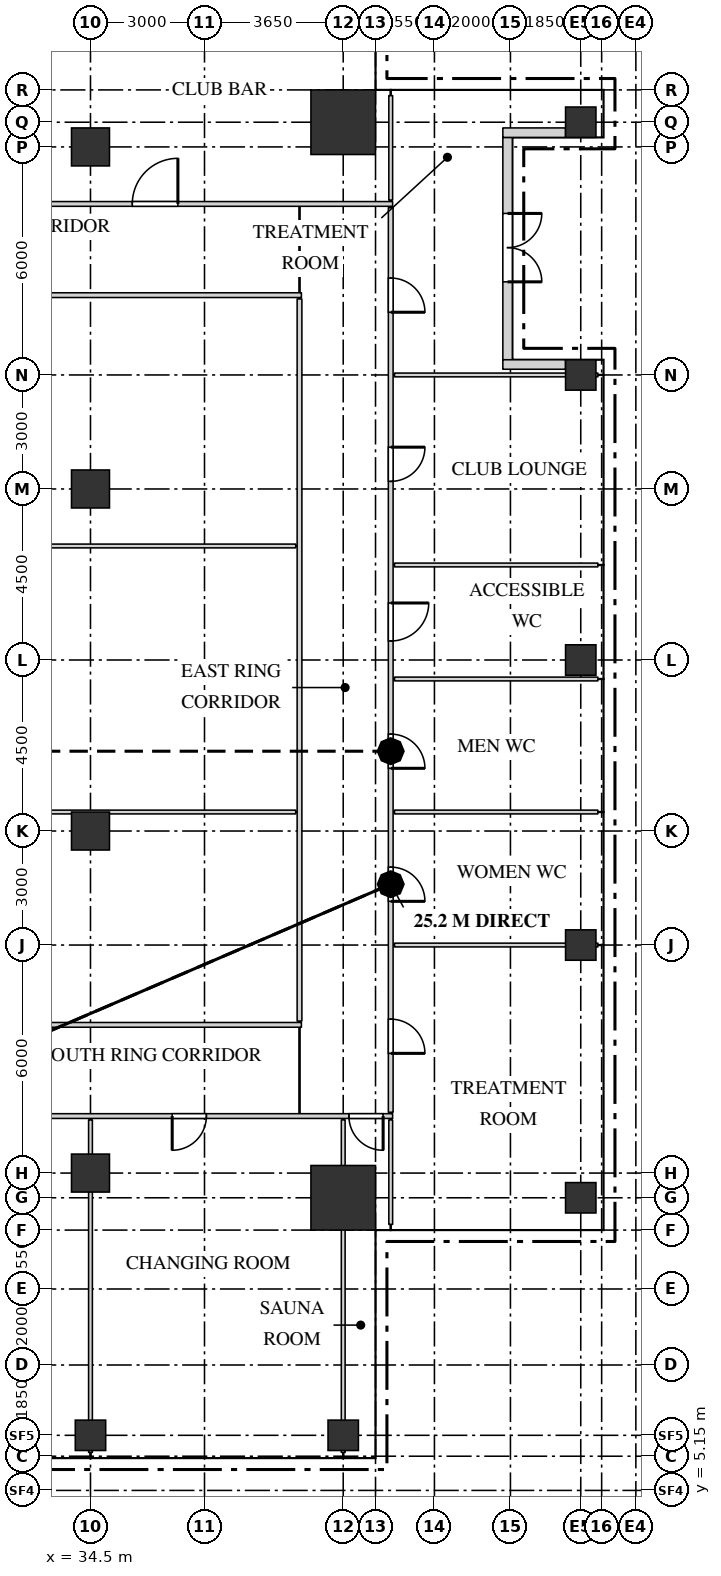
"""IFC4 building model, lengths in metres.
Left out: names, types, materials, properties, quantities, classifications, styles, units other than length and angle.
Written with IfcOpenShell. Run it as: python <this file> out.ifc"""

import sys

from ifc_helpers import new_model, si_unit, direction, frame, frame_2d, origin, origin_2d, place, context, subcontext, project, spatial, rectangle, extrude, source, transform, mapped, element, fill, save


model = new_model("IFC4")
c1 = context("Model", 3, precision=1e-05, world=origin(), true_north=direction((0.0, 1.0)))
c2 = subcontext(c1, "Body", "Model", "MODEL_VIEW")
j1 = project(units=[si_unit("LENGTHUNIT", "METRE"), si_unit("PLANEANGLEUNIT", "RADIAN")], contexts=[c1])
p1 = place(None, origin())
s1 = spatial("IfcSite", under=j1, at=p1, CompositionType="ELEMENT")
p2 = place(p1, origin())
s2 = spatial("IfcBuilding", under=s1, at=p2, CompositionType="ELEMENT")
p3 = place(p2, frame((0.0, 0.0, 298.2)))
s3 = spatial("IfcBuildingStorey", under=s2, at=p3, CompositionType="ELEMENT", Elevation=298.2)
m1 = source(origin(), c2, "Body", "SweptSolid", [
    extrude(rectangle(XDim=1.7, YDim=1.7, at=origin_2d()), origin(), (0.0, 0.0, 1.0), 3.75),
])
for number, where, z_axis, x_axis in (
    (1, (41.15, 41.15, 0.0), (0.0, 0.0, 1.0), (1.0, 0.0, 0.0)),
    (2, (41.15, 12.85, 0.0), (0.0, 0.0, 1.0), (1.0, 0.0, 0.0)),
):
    element("IfcColumn", number, at=place(p3, frame(where, z_axis=z_axis, x_axis=x_axis)), inside=s3, PredefinedType="COLUMN", context=c2, shape_type="MappedRepresentation", body=[
        mapped(m1, transform((0.0, 0.0, 0.0))),
    ])
m2 = source(origin(), c2, "Body", "SweptSolid", [
    extrude(rectangle(XDim=0.8, YDim=0.8, at=origin_2d()), origin(), (0.0, 0.0, 1.0), 3.75),
])
for number, where, z_axis, x_axis in (
    (3, (34.5, 6.6, 0.0), (0.0, 0.0, 1.0), (1.0, 0.0, 0.0)),
    (4, (41.15, 6.6, 0.0), (0.0, 0.0, 1.0), (1.0, 0.0, 0.0)),
    (5, (47.4, 12.85, 0.0), (0.0, 0.0, 1.0), (1.0, 0.0, 0.0)),
    (6, (47.4, 19.5, 0.0), (0.0, 0.0, 1.0), (1.0, 0.0, 0.0)),
    (7, (47.4, 27.0, 0.0), (0.0, 0.0, 1.0), (1.0, 0.0, 0.0)),
    (8, (47.4, 34.5, 0.0), (0.0, 0.0, 1.0), (1.0, 0.0, 0.0)),
    (9, (47.4, 41.15, 0.0), (0.0, 0.0, 1.0), (1.0, 0.0, 0.0)),
):
    element("IfcColumn", number, at=place(p3, frame(where, z_axis=z_axis, x_axis=x_axis)), inside=s3, PredefinedType="COLUMN", context=c2, shape_type="MappedRepresentation", body=[
        mapped(m2, transform((0.0, 0.0, 0.0))),
    ])
m3 = source(origin(), c2, "Body", "SweptSolid", [
    extrude(rectangle(XDim=1.0, YDim=1.0, at=origin_2d()), origin(), (0.0, 0.0, 1.0), 3.75),
])
for number, where, z_axis, x_axis in (
    (10, (34.5, 13.5, 0.0), (0.0, 0.0, 1.0), (1.0, 0.0, 0.0)),
    (11, (34.5, 22.5, 0.0), (0.0, 0.0, 1.0), (1.0, 0.0, 0.0)),
    (12, (34.5, 31.5, 0.0), (0.0, 0.0, 1.0), (1.0, 0.0, 0.0)),
    (13, (34.5, 40.5, 0.0), (0.0, 0.0, 1.0), (1.0, 0.0, 0.0)),
):
    element("IfcColumn", number, at=place(p3, frame(where, z_axis=z_axis, x_axis=x_axis)), inside=s3, PredefinedType="COLUMN", context=c2, shape_type="MappedRepresentation", body=[
        mapped(m3, transform((0.0, 0.0, 0.0))),
    ])
m4 = source(origin(), c2, "Body", "SweptSolid", [
    extrude(rectangle(XDim=5.85, YDim=0.25, at=frame_2d((2.925, 0.0))), origin(), (0.0, 0.0, 1.0), 3.75),
])
p4 = place(p3, frame((45.475, 34.9, 0.0), z_axis=(0.0, 0.0, 1.0), x_axis=(0.0, 1.0, 0.0)))
e14 = element("IfcWall", 14, at=p4, inside=s3, PredefinedType="SOLIDWALL", context=c2, shape_type="MappedRepresentation", body=[
    mapped(m4, transform((0.0, 0.0, 0.0))),
])
m5 = source(origin(), c2, "Body", "SweptSolid", [
    extrude(rectangle(XDim=1.4, YDim=2.4, at=frame_2d((0.7, 1.2))), frame((0.0, 0.135, 0.0), z_axis=(0.0, -1.0, 0.0), x_axis=(1.0, 0.0, 0.0)), (0.0, 0.0, 1.0), 0.27),
])
p5 = place(p4, frame((0.35, 0.0, 0.0)))
e15 = element("IfcOpeningElement", 15, at=p5, cuts=e14, PredefinedType="OPENING", context=c2, shape_type="MappedRepresentation", body=[
    mapped(m5, transform((0.0, 0.0, 0.0))),
])
p6 = place(p4, frame((4.15, 0.0, 0.0)))
e16 = element("IfcOpeningElement", 16, at=p6, cuts=e14, PredefinedType="OPENING", context=c2, shape_type="MappedRepresentation", body=[
    mapped(m5, transform((0.0, 0.0, 0.0))),
])
m6 = source(origin(), c2, "Body", "SweptSolid", [
    extrude(rectangle(XDim=1.8, YDim=2.4, at=frame_2d((0.9, 1.2))), frame((0.0, 0.135, 0.0), z_axis=(0.0, -1.0, 0.0), x_axis=(1.0, 0.0, 0.0)), (0.0, 0.0, 1.0), 0.27),
])
p7 = place(p4, frame((2.05, 0.0, 0.0)))
e17 = element("IfcOpeningElement", 17, at=p7, cuts=e14, PredefinedType="OPENING", context=c2, shape_type="MappedRepresentation", body=[
    mapped(m6, transform((0.0, 0.0, 0.0))),
])
m7 = source(origin(), c2, "Body", "SweptSolid", [
    extrude(rectangle(XDim=1.65, YDim=0.25, at=frame_2d((0.825, 0.0))), origin(), (0.0, 0.0, 1.0), 3.45),
])
for number, where, z_axis, x_axis in (
    (18, (47.0, 34.775, 0.0), (0.0, 0.0, 1.0), (-1.0, 0.0, 0.0)),
    (19, (47.0, 40.875, 0.0), (0.0, 0.0, 1.0), (-1.0, 0.0, 0.0)),
):
    element("IfcWall", number, at=place(p3, frame(where, z_axis=z_axis, x_axis=x_axis)), inside=s3, PredefinedType="SOLIDWALL", context=c2, shape_type="MappedRepresentation", body=[
        mapped(m7, transform((0.0, 0.0, 0.0))),
    ])
m8 = source(origin(), c2, "Body", "SweptSolid", [
    extrude(rectangle(XDim=8.75, YDim=0.1, at=frame_2d((4.375, 0.0))), origin(), (0.0, 0.0, 1.0), 3.35),
])
for number, where, z_axis, x_axis in (
    (20, (34.5, 6.15, 0.0), (0.0, 0.0, 1.0), (0.0, 1.0, 0.0)),
    (21, (41.15, 6.15, 0.0), (0.0, 0.0, 1.0), (0.0, 1.0, 0.0)),
):
    element("IfcWall", number, at=place(p3, frame(where, z_axis=z_axis, x_axis=x_axis)), inside=s3, PredefinedType="PARTITIONING", context=c2, shape_type="MappedRepresentation", body=[
        mapped(m8, transform((0.0, 0.0, 0.0))),
    ])
m9 = source(origin(), c2, "Body", "SweptSolid", [
    extrude(rectangle(XDim=2.75, YDim=0.1, at=frame_2d((1.375, 0.0))), origin(), (0.0, 0.0, 1.0), 3.8),
])
p8 = place(p3, frame((42.4, 12.15, 0.0), z_axis=(0.0, 0.0, 1.0), x_axis=(0.0, 1.0, 0.0)))
e22 = element("IfcWall", 22, at=p8, inside=s3, PredefinedType="PARTITIONING", context=c2, shape_type="MappedRepresentation", body=[
    mapped(m9, transform((0.0, 0.0, 0.0))),
])
m10 = source(origin(), c2, "Body", "SweptSolid", [
    extrude(rectangle(XDim=19.1, YDim=0.125, at=frame_2d((9.55, 0.0))), origin(), (0.0, 0.0, 1.0), 3.8),
])
p9 = place(p3, frame((23.35, 15.0, 0.0), z_axis=(0.0, 0.0, 1.0), x_axis=(1.0, 0.0, 0.0)))
e23 = element("IfcWall", 23, at=p9, inside=s3, PredefinedType="PARTITIONING", context=c2, shape_type="MappedRepresentation", body=[
    mapped(m10, transform((0.0, 0.0, 0.0))),
])
m11 = source(origin(), c2, "Body", "SweptSolid", [
    extrude(rectangle(XDim=0.9, YDim=2.1, at=frame_2d((0.45, 1.05))), frame((0.0, 0.073, 0.0), z_axis=(0.0, -1.0, 0.0), x_axis=(1.0, 0.0, 0.0)), (0.0, 0.0, 1.0), 0.145),
])
p10 = place(p9, frame((5.3, 0.0, 0.0)))
e24 = element("IfcOpeningElement", 24, at=p10, cuts=e23, PredefinedType="OPENING", context=c2, shape_type="MappedRepresentation", body=[
    mapped(m11, transform((0.0, 0.0, 0.0))),
])
p11 = place(p9, frame((13.3, 0.0, 0.0)))
e25 = element("IfcOpeningElement", 25, at=p11, cuts=e23, PredefinedType="OPENING", context=c2, shape_type="MappedRepresentation", body=[
    mapped(m11, transform((0.0, 0.0, 0.0))),
])
p12 = place(p9, frame((17.95, 0.0, 0.0)))
e26 = element("IfcOpeningElement", 26, at=p12, cuts=e23, PredefinedType="OPENING", context=c2, shape_type="MappedRepresentation", body=[
    mapped(m11, transform((0.0, 0.0, 0.0))),
])
m12 = source(origin(), c2, "Body", "SweptSolid", [
    extrude(rectangle(XDim=23.8, YDim=0.125, at=frame_2d((11.9, 0.0))), origin(), (0.0, 0.0, 1.0), 3.8),
])
p13 = place(p3, frame((42.4, 15.1, 0.0), z_axis=(0.0, 0.0, 1.0), x_axis=(0.0, 1.0, 0.0)))
e27 = element("IfcWall", 27, at=p13, inside=s3, PredefinedType="PARTITIONING", context=c2, shape_type="MappedRepresentation", body=[
    mapped(m12, transform((0.0, 0.0, 0.0))),
])
p14 = place(p13, frame((1.55, 0.0, 0.0)))
e28 = element("IfcOpeningElement", 28, at=p14, cuts=e27, PredefinedType="OPENING", context=c2, shape_type="MappedRepresentation", body=[
    mapped(m11, transform((0.0, 0.0, 0.0))),
])
p15 = place(p13, frame((5.55, 0.0, 0.0)))
e29 = element("IfcOpeningElement", 29, at=p15, cuts=e27, PredefinedType="OPENING", context=c2, shape_type="MappedRepresentation", body=[
    mapped(m11, transform((0.0, 0.0, 0.0))),
])
p16 = place(p13, frame((9.05, 0.0, 0.0)))
e30 = element("IfcOpeningElement", 30, at=p16, cuts=e27, PredefinedType="OPENING", context=c2, shape_type="MappedRepresentation", body=[
    mapped(m11, transform((0.0, 0.0, 0.0))),
])
m13 = source(origin(), c2, "Body", "SweptSolid", [
    extrude(rectangle(XDim=1.0, YDim=2.1, at=frame_2d((0.5, 1.05))), frame((0.0, 0.073, 0.0), z_axis=(0.0, -1.0, 0.0), x_axis=(1.0, 0.0, 0.0)), (0.0, 0.0, 1.0), 0.145),
])
p17 = place(p13, frame((12.4, 0.0, 0.0)))
e31 = element("IfcOpeningElement", 31, at=p17, cuts=e27, PredefinedType="OPENING", context=c2, shape_type="MappedRepresentation", body=[
    mapped(m13, transform((0.0, 0.0, 0.0))),
])
p18 = place(p13, frame((16.6, 0.0, 0.0)))
e32 = element("IfcOpeningElement", 32, at=p18, cuts=e27, PredefinedType="OPENING", context=c2, shape_type="MappedRepresentation", body=[
    mapped(m11, transform((0.0, 0.0, 0.0))),
])
p19 = place(p13, frame((21.05, 0.0, 0.0)))
e33 = element("IfcOpeningElement", 33, at=p19, cuts=e27, PredefinedType="OPENING", context=c2, shape_type="MappedRepresentation", body=[
    mapped(m11, transform((0.0, 0.0, 0.0))),
])
m14 = source(origin(), c2, "Body", "SweptSolid", [
    extrude(rectangle(XDim=16.7, YDim=0.125, at=frame_2d((8.35, 0.0))), origin(), (0.0, 0.0, 1.0), 3.8),
])
p20 = place(p3, frame((23.35, 17.4, 0.0), z_axis=(0.0, 0.0, 1.0), x_axis=(1.0, 0.0, 0.0)))
e34 = element("IfcWall", 34, at=p20, inside=s3, PredefinedType="PARTITIONING", context=c2, shape_type="MappedRepresentation", body=[
    mapped(m14, transform((0.0, 0.0, 0.0))),
])
p21 = place(p20, frame((8.05, 0.0, 0.0)))
e35 = element("IfcOpeningElement", 35, at=p21, cuts=e34, PredefinedType="OPENING", context=c2, shape_type="MappedRepresentation", body=[
    mapped(m11, transform((0.0, 0.0, 0.0))),
])
m15 = source(origin(), c2, "Body", "SweptSolid", [
    extrude(rectangle(XDim=19.0, YDim=0.125, at=frame_2d((9.5, 0.0))), origin(), (0.0, 0.0, 1.0), 3.8),
])
p22 = place(p3, frame((40.0, 17.5, 0.0), z_axis=(0.0, 0.0, 1.0), x_axis=(0.0, 1.0, 0.0)))
e36 = element("IfcWall", 36, at=p22, inside=s3, PredefinedType="PARTITIONING", context=c2, shape_type="MappedRepresentation", body=[
    mapped(m15, transform((0.0, 0.0, 0.0))),
])
m16 = source(origin(), c2, "Body", "SweptSolid", [
    extrude(rectangle(XDim=5.35, YDim=0.1, at=frame_2d((2.675, 0.0))), origin(), (0.0, 0.0, 1.0), 3.8),
])
p23 = place(p3, frame((42.5, 19.5, 0.0), z_axis=(0.0, 0.0, 1.0), x_axis=(1.0, 0.0, 0.0)))
e37 = element("IfcWall", 37, at=p23, inside=s3, PredefinedType="PARTITIONING", context=c2, shape_type="MappedRepresentation", body=[
    mapped(m16, transform((0.0, 0.0, 0.0))),
])
m17 = source(origin(), c2, "Body", "SweptSolid", [
    extrude(rectangle(XDim=16.4, YDim=0.1, at=frame_2d((8.2, 0.0))), origin(), (0.0, 0.0, 1.0), 3.8),
])
p24 = place(p3, frame((23.5, 23.0, 0.0), z_axis=(0.0, 0.0, 1.0), x_axis=(1.0, 0.0, 0.0)))
e38 = element("IfcWall", 38, at=p24, inside=s3, PredefinedType="PARTITIONING", context=c2, shape_type="MappedRepresentation", body=[
    mapped(m17, transform((0.0, 0.0, 0.0))),
])
for number, where, z_axis, x_axis in (
    (39, (42.5, 23.0, 0.0), (0.0, 0.0, 1.0), (1.0, 0.0, 0.0)),
    (40, (42.5, 26.5, 0.0), (0.0, 0.0, 1.0), (1.0, 0.0, 0.0)),
    (41, (42.5, 29.5, 0.0), (0.0, 0.0, 1.0), (1.0, 0.0, 0.0)),
):
    element("IfcWall", number, at=place(p3, frame(where, z_axis=z_axis, x_axis=x_axis)), inside=s3, PredefinedType="PARTITIONING", context=c2, shape_type="MappedRepresentation", body=[
        mapped(m16, transform((0.0, 0.0, 0.0))),
    ])
p25 = place(p3, frame((23.5, 30.0, 0.0), z_axis=(0.0, 0.0, 1.0), x_axis=(1.0, 0.0, 0.0)))
e42 = element("IfcWall", 42, at=p25, inside=s3, PredefinedType="PARTITIONING", context=c2, shape_type="MappedRepresentation", body=[
    mapped(m17, transform((0.0, 0.0, 0.0))),
])
p26 = place(p3, frame((42.5, 34.5, 0.0), z_axis=(0.0, 0.0, 1.0), x_axis=(1.0, 0.0, 0.0)))
e43 = element("IfcWall", 43, at=p26, inside=s3, PredefinedType="PARTITIONING", context=c2, shape_type="MappedRepresentation", body=[
    mapped(m16, transform((0.0, 0.0, 0.0))),
])
p27 = place(p3, frame((23.35, 36.6, 0.0), z_axis=(0.0, 0.0, 1.0), x_axis=(1.0, 0.0, 0.0)))
e44 = element("IfcWall", 44, at=p27, inside=s3, PredefinedType="PARTITIONING", context=c2, shape_type="MappedRepresentation", body=[
    mapped(m14, transform((0.0, 0.0, 0.0))),
])
p28 = place(p27, frame((8.05, 0.0, 0.0)))
e45 = element("IfcOpeningElement", 45, at=p28, cuts=e44, PredefinedType="OPENING", context=c2, shape_type="MappedRepresentation", body=[
    mapped(m11, transform((0.0, 0.0, 0.0))),
])
m18 = source(origin(), c2, "Body", "SweptSolid", [
    extrude(rectangle(XDim=12.1, YDim=0.125, at=frame_2d((6.05, 0.0))), origin(), (0.0, 0.0, 1.0), 3.8),
])
p29 = place(p3, frame((30.35, 39.0, 0.0), z_axis=(0.0, 0.0, 1.0), x_axis=(1.0, 0.0, 0.0)))
e46 = element("IfcWall", 46, at=p29, inside=s3, PredefinedType="PARTITIONING", context=c2, shape_type="MappedRepresentation", body=[
    mapped(m18, transform((0.0, 0.0, 0.0))),
])
m19 = source(origin(), c2, "Body", "SweptSolid", [
    extrude(rectangle(XDim=1.2, YDim=2.1, at=frame_2d((0.6, 1.05))), frame((0.0, 0.073, 0.0), z_axis=(0.0, -1.0, 0.0), x_axis=(1.0, 0.0, 0.0)), (0.0, 0.0, 1.0), 0.145),
])
p30 = place(p29, frame((5.25, 0.0, 0.0)))
e47 = element("IfcOpeningElement", 47, at=p30, cuts=e46, PredefinedType="OPENING", context=c2, shape_type="MappedRepresentation", body=[
    mapped(m19, transform((0.0, 0.0, 0.0))),
])
p31 = place(p3, frame((42.4, 39.1, 0.0), z_axis=(0.0, 0.0, 1.0), x_axis=(0.0, 1.0, 0.0)))
e48 = element("IfcWall", 48, at=p31, inside=s3, PredefinedType="PARTITIONING", context=c2, shape_type="MappedRepresentation", body=[
    mapped(m9, transform((0.0, 0.0, 0.0))),
])
m20 = source(origin(), c2, "Body", "SweptSolid", [
    extrude(rectangle(XDim=1.4, YDim=2.4, at=frame_2d((0.7, 1.2))), frame((0.0, 0.03, 0.0), z_axis=(0.0, -1.0, 0.0), x_axis=(1.0, 0.0, 0.0)), (0.0, 0.0, 1.0), 0.06),
])
p32 = place(p5, origin())
e49 = element("IfcWindow", 49, at=p32, inside=s3, PartitioningType="SINGLE_PANEL", PredefinedType="WINDOW", context=c2, shape_type="MappedRepresentation", body=[
    mapped(m20, transform((0.0, 0.0, 0.0))),
])
fill(e15, e49)
p33 = place(p6, origin())
e50 = element("IfcWindow", 50, at=p33, inside=s3, PartitioningType="SINGLE_PANEL", PredefinedType="WINDOW", context=c2, shape_type="MappedRepresentation", body=[
    mapped(m20, transform((0.0, 0.0, 0.0))),
])
fill(e16, e50)
m21 = source(origin(), c2, "Body", "SweptSolid", [
    extrude(rectangle(XDim=1.8, YDim=2.4, at=frame_2d((0.9, 1.2))), frame((0.0, 0.025, 0.0), z_axis=(0.0, -1.0, 0.0), x_axis=(1.0, 0.0, 0.0)), (0.0, 0.0, 1.0), 0.05),
])
p34 = place(p7, origin())
e51 = element("IfcDoor", 51, at=p34, inside=s3, OperationType="DOUBLE_DOOR_DOUBLE_SWING", PredefinedType="DOOR", context=c2, shape_type="MappedRepresentation", body=[
    mapped(m21, transform((0.0, 0.0, 0.0))),
])
fill(e17, e51)
m22 = source(origin(), c2, "Body", "SweptSolid", [
    extrude(rectangle(XDim=0.9, YDim=2.1, at=frame_2d((0.45, 1.05))), frame((0.0, 0.025, 0.0), z_axis=(0.0, -1.0, 0.0), x_axis=(1.0, 0.0, 0.0)), (0.0, 0.0, 1.0), 0.05),
])
p35 = place(p11, origin())
e52 = element("IfcDoor", 52, at=p35, inside=s3, OperationType="SINGLE_SWING_LEFT", PredefinedType="DOOR", context=c2, shape_type="MappedRepresentation", body=[
    mapped(m22, transform((0.0, 0.0, 0.0))),
])
fill(e25, e52)
p36 = place(p12, origin())
e53 = element("IfcDoor", 53, at=p36, inside=s3, OperationType="SINGLE_SWING_RIGHT", PredefinedType="DOOR", context=c2, shape_type="MappedRepresentation", body=[
    mapped(m22, transform((0.0, 0.0, 0.0))),
])
fill(e26, e53)
p37 = place(p14, origin())
e54 = element("IfcDoor", 54, at=p37, inside=s3, OperationType="SINGLE_SWING_LEFT", PredefinedType="DOOR", context=c2, shape_type="MappedRepresentation", body=[
    mapped(m22, transform((0.0, 0.0, 0.0))),
])
fill(e28, e54)
p38 = place(p15, origin())
e55 = element("IfcDoor", 55, at=p38, inside=s3, OperationType="SINGLE_SWING_LEFT", PredefinedType="DOOR", context=c2, shape_type="MappedRepresentation", body=[
    mapped(m22, transform((0.0, 0.0, 0.0))),
])
fill(e29, e55)
p39 = place(p16, origin())
e56 = element("IfcDoor", 56, at=p39, inside=s3, OperationType="SINGLE_SWING_LEFT", PredefinedType="DOOR", context=c2, shape_type="MappedRepresentation", body=[
    mapped(m22, transform((0.0, 0.0, 0.0))),
])
fill(e30, e56)
m23 = source(origin(), c2, "Body", "SweptSolid", [
    extrude(rectangle(XDim=1.0, YDim=2.1, at=frame_2d((0.5, 1.05))), frame((0.0, 0.025, 0.0), z_axis=(0.0, -1.0, 0.0), x_axis=(1.0, 0.0, 0.0)), (0.0, 0.0, 1.0), 0.05),
])
p40 = place(p17, origin())
e57 = element("IfcDoor", 57, at=p40, inside=s3, OperationType="SINGLE_SWING_RIGHT", PredefinedType="DOOR", context=c2, shape_type="MappedRepresentation", body=[
    mapped(m23, transform((0.0, 0.0, 0.0))),
])
fill(e31, e57)
p41 = place(p18, origin())
e58 = element("IfcDoor", 58, at=p41, inside=s3, OperationType="SINGLE_SWING_RIGHT", PredefinedType="DOOR", context=c2, shape_type="MappedRepresentation", body=[
    mapped(m22, transform((0.0, 0.0, 0.0))),
])
fill(e32, e58)
p42 = place(p19, origin())
e59 = element("IfcDoor", 59, at=p42, inside=s3, OperationType="SINGLE_SWING_LEFT", PredefinedType="DOOR", context=c2, shape_type="MappedRepresentation", body=[
    mapped(m22, transform((0.0, 0.0, 0.0))),
])
fill(e33, e59)
m24 = source(origin(), c2, "Body", "SweptSolid", [
    extrude(rectangle(XDim=1.2, YDim=2.1, at=frame_2d((0.6, 1.05))), frame((0.0, 0.025, 0.0), z_axis=(0.0, -1.0, 0.0), x_axis=(1.0, 0.0, 0.0)), (0.0, 0.0, 1.0), 0.05),
])
p43 = place(p30, origin())
e60 = element("IfcDoor", 60, at=p43, inside=s3, OperationType="SINGLE_SWING_LEFT", PredefinedType="DOOR", context=c2, shape_type="MappedRepresentation", body=[
    mapped(m24, transform((0.0, 0.0, 0.0))),
])
fill(e47, e60)
save(model, sys.argv[1])
